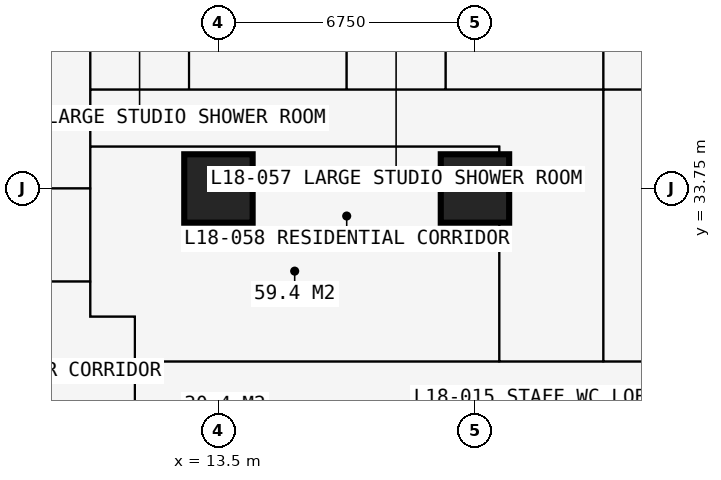
"""IFC4 building model, lengths in metres.
Left out: names, types, materials, properties, quantities, classifications, styles, units other than length and angle.
Written with IfcOpenShell. Run it as: python <this file> out.ifc"""

import sys

from ifc_helpers import new_model, si_unit, direction, frame, frame_2d, origin, origin_2d, place, context, subcontext, project, spatial, rectangle, extrude, element, fill, save


model = new_model("IFC4")
c1 = context("Model", 3, precision=1e-05, world=origin(), true_north=direction((0.0, 1.0)))
c2 = subcontext(c1, "Body", "Model", "MODEL_VIEW")
j1 = project(units=[si_unit("LENGTHUNIT", "METRE"), si_unit("PLANEANGLEUNIT", "RADIAN")], contexts=[c1])
p1 = place(None, origin())
s1 = spatial("IfcSite", under=j1, at=p1, CompositionType="ELEMENT")
p2 = place(p1, origin())
s2 = spatial("IfcBuilding", under=s1, at=p2, CompositionType="ELEMENT")
p3 = place(p2, frame((0.0, 0.0, 68.4)))
s3 = spatial("IfcBuildingStorey", under=s2, at=p3, CompositionType="ELEMENT", Elevation=68.4)
for number, where, z_axis, x_axis in (
    (1, (13.5, 33.75, 0.0), (0.0, 0.0, 1.0), (1.0, 0.0, 0.0)),
    (2, (20.25, 33.75, 0.0), (0.0, 0.0, 1.0), (1.0, 0.0, 0.0)),
):
    element("IfcColumn", number, at=place(p3, frame(where, z_axis=z_axis, x_axis=x_axis)), inside=s3, PredefinedType="COLUMN", context=c2, shape_type="SweptSolid", body=[
        extrude(rectangle(XDim=1.8, YDim=1.8, at=origin_2d()), origin(), (0.0, 0.0, 1.0), 3.6),
    ])
p4 = place(p3, frame((-0.734, 33.75, 0.0), z_axis=(0.0, 0.0, 1.0), x_axis=(1.0, 0.0, 0.0)))
e3 = element("IfcWall", 3, at=p4, inside=s3, PredefinedType="PARTITIONING", context=c2, shape_type="SweptSolid", body=[
    extrude(rectangle(XDim=10.859, YDim=0.15, at=frame_2d((5.429, 0.0))), origin(), (0.0, 0.0, 1.0), 2.877),
])
p5 = place(p4, frame((8.434, 0.0, 0.0)))
e4 = element("IfcOpeningElement", 4, at=p5, cuts=e3, PredefinedType="OPENING", context=c2, shape_type="SweptSolid", body=[
    extrude(rectangle(XDim=1.0, YDim=2.2, at=frame_2d((0.5, 1.1))), frame((0.0, 0.085, 0.0), z_axis=(0.0, -1.0, 0.0), x_axis=(1.0, 0.0, 0.0)), (0.0, 0.0, 1.0), 0.17),
])
p6 = place(p3, frame((5.65, 31.3, 0.0), z_axis=(0.0, 0.0, 1.0), x_axis=(1.0, 0.0, 0.0)))
e5 = element("IfcWall", 5, at=p6, inside=s3, PredefinedType="PARTITIONING", context=c2, shape_type="SweptSolid", body=[
    extrude(rectangle(XDim=4.475, YDim=0.15, at=frame_2d((2.238, 0.0))), origin(), (0.0, 0.0, 1.0), 3.375),
])
p7 = place(p3, frame((10.125, 30.375, 0.0), z_axis=(0.0, 0.0, 1.0), x_axis=(0.0, 1.0, 0.0)))
e6 = element("IfcWall", 6, at=p7, inside=s3, PredefinedType="PARTITIONING", context=c2, shape_type="SweptSolid", body=[
    extrude(rectangle(XDim=10.859, YDim=0.15, at=frame_2d((5.429, 0.0))), origin(), (0.0, 0.0, 1.0), 3.375),
])
p8 = place(p3, frame((10.125, 30.375, 0.0), z_axis=(0.0, 0.0, 1.0), x_axis=(1.0, 0.0, 0.0)))
e7 = element("IfcWall", 7, at=p8, inside=s3, PredefinedType="PARTITIONING", context=c2, shape_type="SweptSolid", body=[
    extrude(rectangle(XDim=1.175, YDim=0.15, at=frame_2d((0.587, 0.0))), origin(), (0.0, 0.0, 1.0), 3.375),
])
p9 = place(p3, frame((10.125, 34.85, 0.0), z_axis=(0.0, 0.0, 1.0), x_axis=(1.0, 0.0, 0.0)))
e8 = element("IfcWall", 8, at=p9, inside=s3, PredefinedType="PARTITIONING", context=c2, shape_type="SweptSolid", body=[
    extrude(rectangle(XDim=10.762, YDim=0.15, at=frame_2d((5.381, 0.0))), origin(), (0.0, 0.0, 1.0), 3.375),
])
p10 = place(p9, frame((4.9, 0.0, 0.0)))
e9 = element("IfcOpeningElement", 9, at=p10, cuts=e8, PredefinedType="OPENING", context=c2, shape_type="SweptSolid", body=[
    extrude(rectangle(XDim=0.95, YDim=2.2, at=frame_2d((0.475, 1.1))), frame((0.0, 0.085, 0.0), z_axis=(0.0, -1.0, 0.0), x_axis=(1.0, 0.0, 0.0)), (0.0, 0.0, 1.0), 0.17),
])
p11 = place(p3, frame((10.125, 36.35, 0.0), z_axis=(0.0, 0.0, 1.0), x_axis=(1.0, 0.0, 0.0)))
e10 = element("IfcWall", 10, at=p11, inside=s3, PredefinedType="PARTITIONING", context=c2, shape_type="SweptSolid", body=[
    extrude(rectangle(XDim=23.625, YDim=0.15, at=frame_2d((11.812, 0.0))), origin(), (0.0, 0.0, 1.0), 3.375),
])
p12 = place(p11, frame((21.45, 0.0, 0.0)))
e11 = element("IfcOpeningElement", 11, at=p12, cuts=e10, PredefinedType="OPENING", context=c2, shape_type="SweptSolid", body=[
    extrude(rectangle(XDim=1.0, YDim=2.2, at=frame_2d((0.5, 1.1))), frame((0.0, 0.085, 0.0), z_axis=(0.0, -1.0, 0.0), x_axis=(1.0, 0.0, 0.0)), (0.0, 0.0, 1.0), 0.17),
])
p13 = place(p11, frame((17.125, 0.0, 0.0)))
e12 = element("IfcOpeningElement", 12, at=p13, cuts=e10, PredefinedType="OPENING", context=c2, shape_type="SweptSolid", body=[
    extrude(rectangle(XDim=0.95, YDim=2.2, at=frame_2d((0.475, 1.1))), frame((0.0, 0.085, 0.0), z_axis=(0.0, -1.0, 0.0), x_axis=(1.0, 0.0, 0.0)), (0.0, 0.0, 1.0), 0.17),
])
p14 = place(p11, frame((13.7, 0.0, 0.0)))
e13 = element("IfcOpeningElement", 13, at=p14, cuts=e10, PredefinedType="OPENING", context=c2, shape_type="SweptSolid", body=[
    extrude(rectangle(XDim=0.95, YDim=2.2, at=frame_2d((0.475, 1.1))), frame((0.0, 0.085, 0.0), z_axis=(0.0, -1.0, 0.0), x_axis=(1.0, 0.0, 0.0)), (0.0, 0.0, 1.0), 0.17),
])
p15 = place(p11, frame((4.2, 0.0, 0.0)))
e14 = element("IfcOpeningElement", 14, at=p15, cuts=e10, PredefinedType="OPENING", context=c2, shape_type="SweptSolid", body=[
    extrude(rectangle(XDim=0.95, YDim=2.2, at=frame_2d((0.475, 1.1))), frame((0.0, 0.085, 0.0), z_axis=(0.0, -1.0, 0.0), x_axis=(1.0, 0.0, 0.0)), (0.0, 0.0, 1.0), 0.17),
])
p16 = place(p11, frame((10.95, 0.0, 0.0)))
e15 = element("IfcOpeningElement", 15, at=p16, cuts=e10, PredefinedType="OPENING", context=c2, shape_type="SweptSolid", body=[
    extrude(rectangle(XDim=0.95, YDim=2.2, at=frame_2d((0.475, 1.1))), frame((0.0, 0.085, 0.0), z_axis=(0.0, -1.0, 0.0), x_axis=(1.0, 0.0, 0.0)), (0.0, 0.0, 1.0), 0.17),
])
p17 = place(p3, frame((11.3, 11.3, 0.0), z_axis=(0.0, 0.0, 1.0), x_axis=(0.0, 1.0, 0.0)))
e16 = element("IfcWall", 16, at=p17, inside=s3, PredefinedType="PARTITIONING", context=c2, shape_type="SweptSolid", body=[
    extrude(rectangle(XDim=19.075, YDim=0.15, at=frame_2d((9.538, 0.0))), origin(), (0.0, 0.0, 1.0), 3.375),
])
p18 = place(p17, frame((12.875, 0.0, 0.0)))
e17 = element("IfcOpeningElement", 17, at=p18, cuts=e16, PredefinedType="OPENING", context=c2, shape_type="SweptSolid", body=[
    extrude(rectangle(XDim=1.0, YDim=2.2, at=frame_2d((0.5, 1.1))), frame((0.0, 0.085, 0.0), z_axis=(0.0, -1.0, 0.0), x_axis=(1.0, 0.0, 0.0)), (0.0, 0.0, 1.0), 0.17),
])
p19 = place(p17, frame((10.438, 0.0, 0.0)))
e18 = element("IfcOpeningElement", 18, at=p19, cuts=e16, PredefinedType="OPENING", context=c2, shape_type="SweptSolid", body=[
    extrude(rectangle(XDim=1.0, YDim=2.2, at=frame_2d((0.5, 1.1))), frame((0.0, 0.085, 0.0), z_axis=(0.0, -1.0, 0.0), x_axis=(1.0, 0.0, 0.0)), (0.0, 0.0, 1.0), 0.17),
])
p20 = place(p17, frame((15.675, 0.0, 0.0)))
e19 = element("IfcOpeningElement", 19, at=p20, cuts=e16, PredefinedType="OPENING", context=c2, shape_type="SweptSolid", body=[
    extrude(rectangle(XDim=0.95, YDim=2.2, at=frame_2d((0.475, 1.1))), frame((0.0, 0.085, 0.0), z_axis=(0.0, -1.0, 0.0), x_axis=(1.0, 0.0, 0.0)), (0.0, 0.0, 1.0), 0.17),
])
p21 = place(p3, frame((11.3, 29.2, 0.0), z_axis=(0.0, 0.0, 1.0), x_axis=(1.0, 0.0, 0.0)))
e20 = element("IfcWall", 20, at=p21, inside=s3, PredefinedType="PARTITIONING", context=c2, shape_type="SweptSolid", body=[
    extrude(rectangle(XDim=19.075, YDim=0.15, at=frame_2d((9.538, 0.0))), origin(), (0.0, 0.0, 1.0), 3.375),
])
p22 = place(p21, frame((12.875, 0.0, 0.0)))
e21 = element("IfcOpeningElement", 21, at=p22, cuts=e20, PredefinedType="OPENING", context=c2, shape_type="SweptSolid", body=[
    extrude(rectangle(XDim=1.0, YDim=2.2, at=frame_2d((0.5, 1.1))), frame((0.0, 0.085, 0.0), z_axis=(0.0, -1.0, 0.0), x_axis=(1.0, 0.0, 0.0)), (0.0, 0.0, 1.0), 0.17),
])
p23 = place(p21, frame((10.438, 0.0, 0.0)))
e22 = element("IfcOpeningElement", 22, at=p23, cuts=e20, PredefinedType="OPENING", context=c2, shape_type="SweptSolid", body=[
    extrude(rectangle(XDim=1.0, YDim=2.2, at=frame_2d((0.5, 1.1))), frame((0.0, 0.085, 0.0), z_axis=(0.0, -1.0, 0.0), x_axis=(1.0, 0.0, 0.0)), (0.0, 0.0, 1.0), 0.17),
])
p24 = place(p21, frame((14.875, 0.0, 0.0)))
e23 = element("IfcOpeningElement", 23, at=p24, cuts=e20, PredefinedType="OPENING", context=c2, shape_type="SweptSolid", body=[
    extrude(rectangle(XDim=0.95, YDim=2.2, at=frame_2d((0.475, 1.1))), frame((0.0, 0.085, 0.0), z_axis=(0.0, -1.0, 0.0), x_axis=(1.0, 0.0, 0.0)), (0.0, 0.0, 1.0), 0.17),
])
p25 = place(p3, frame((12.725, 36.35, 0.0), z_axis=(0.0, 0.0, 1.0), x_axis=(0.0, 1.0, 0.0)))
e24 = element("IfcWall", 24, at=p25, inside=s3, PredefinedType="PARTITIONING", context=c2, shape_type="SweptSolid", body=[
    extrude(rectangle(XDim=2.4, YDim=0.1, at=frame_2d((1.2, 0.0))), origin(), (0.0, 0.0, 1.0), 3.375),
])
p26 = place(p3, frame((16.875, 36.35, 0.0), z_axis=(0.0, 0.0, 1.0), x_axis=(0.0, 1.0, 0.0)))
e25 = element("IfcWall", 25, at=p26, inside=s3, PredefinedType="PARTITIONING", context=c2, shape_type="SweptSolid", body=[
    extrude(rectangle(XDim=4.884, YDim=0.175, at=frame_2d((2.442, 0.0))), origin(), (0.0, 0.0, 1.0), 3.375),
])
p27 = place(p26, frame((0.75, 0.0, 0.0)))
e26 = element("IfcOpeningElement", 26, at=p27, cuts=e25, PredefinedType="OPENING", context=c2, shape_type="SweptSolid", body=[
    extrude(rectangle(XDim=0.9, YDim=2.2, at=frame_2d((0.45, 1.1))), frame((0.0, 0.097, 0.0), z_axis=(0.0, -1.0, 0.0), x_axis=(1.0, 0.0, 0.0)), (0.0, 0.0, 1.0), 0.195),
])
p28 = place(p3, frame((19.475, 36.35, 0.0), z_axis=(0.0, 0.0, 1.0), x_axis=(0.0, 1.0, 0.0)))
e27 = element("IfcWall", 27, at=p28, inside=s3, PredefinedType="PARTITIONING", context=c2, shape_type="SweptSolid", body=[
    extrude(rectangle(XDim=2.4, YDim=0.1, at=frame_2d((1.2, 0.0))), origin(), (0.0, 0.0, 1.0), 3.375),
])
p29 = place(p3, frame((20.887, 29.2, 0.0), z_axis=(0.0, 0.0, 1.0), x_axis=(0.0, 1.0, 0.0)))
e28 = element("IfcWall", 28, at=p29, inside=s3, PredefinedType="PARTITIONING", context=c2, shape_type="SweptSolid", body=[
    extrude(rectangle(XDim=5.65, YDim=0.15, at=frame_2d((2.825, 0.0))), origin(), (0.0, 0.0, 1.0), 3.375),
])
p30 = place(p3, frame((23.625, 29.2, 0.0), z_axis=(0.0, 0.0, 1.0), x_axis=(0.0, 1.0, 0.0)))
e29 = element("IfcWall", 29, at=p30, inside=s3, PredefinedType="PARTITIONING", context=c2, shape_type="SweptSolid", body=[
    extrude(rectangle(XDim=12.034, YDim=0.15, at=frame_2d((6.017, 0.0))), origin(), (0.0, 0.0, 1.0), 3.375),
])
p31 = place(p14, origin())
e30 = element("IfcDoor", 30, at=p31, inside=s3, OperationType="SINGLE_SWING_LEFT", PredefinedType="DOOR", context=c2, shape_type="SweptSolid", body=[
    extrude(rectangle(XDim=0.95, YDim=2.2, at=frame_2d((0.475, 1.1))), frame((0.0, 0.025, 0.0), z_axis=(0.0, -1.0, 0.0), x_axis=(1.0, 0.0, 0.0)), (0.0, 0.0, 1.0), 0.05),
])
fill(e13, e30)
p32 = place(p22, origin())
e31 = element("IfcDoor", 31, at=p32, inside=s3, OperationType="SINGLE_SWING_LEFT", PredefinedType="DOOR", context=c2, shape_type="SweptSolid", body=[
    extrude(rectangle(XDim=1.0, YDim=2.2, at=frame_2d((0.5, 1.1))), frame((0.0, 0.025, 0.0), z_axis=(0.0, -1.0, 0.0), x_axis=(1.0, 0.0, 0.0)), (0.0, 0.0, 1.0), 0.05),
])
fill(e21, e31)
p33 = place(p15, origin())
e32 = element("IfcDoor", 32, at=p33, inside=s3, OperationType="SINGLE_SWING_LEFT", PredefinedType="DOOR", context=c2, shape_type="SweptSolid", body=[
    extrude(rectangle(XDim=0.95, YDim=2.2, at=frame_2d((0.475, 1.1))), frame((0.0, 0.025, 0.0), z_axis=(0.0, -1.0, 0.0), x_axis=(1.0, 0.0, 0.0)), (0.0, 0.0, 1.0), 0.05),
])
fill(e14, e32)
p34 = place(p16, origin())
e33 = element("IfcDoor", 33, at=p34, inside=s3, OperationType="SINGLE_SWING_LEFT", PredefinedType="DOOR", context=c2, shape_type="SweptSolid", body=[
    extrude(rectangle(XDim=0.95, YDim=2.2, at=frame_2d((0.475, 1.1))), frame((0.0, 0.025, 0.0), z_axis=(0.0, -1.0, 0.0), x_axis=(1.0, 0.0, 0.0)), (0.0, 0.0, 1.0), 0.05),
])
fill(e15, e33)
p35 = place(p27, origin())
e34 = element("IfcDoor", 34, at=p35, inside=s3, OperationType="SINGLE_SWING_RIGHT", PredefinedType="DOOR", context=c2, shape_type="SweptSolid", body=[
    extrude(rectangle(XDim=0.9, YDim=2.2, at=frame_2d((0.45, 1.1))), frame((0.0, 0.025, 0.0), z_axis=(0.0, -1.0, 0.0), x_axis=(1.0, 0.0, 0.0)), (0.0, 0.0, 1.0), 0.05),
])
fill(e26, e34)
p36 = place(p23, origin())
e35 = element("IfcDoor", 35, at=p36, inside=s3, OperationType="SINGLE_SWING_LEFT", PredefinedType="DOOR", context=c2, shape_type="SweptSolid", body=[
    extrude(rectangle(XDim=1.0, YDim=2.2, at=frame_2d((0.5, 1.1))), frame((0.0, 0.025, 0.0), z_axis=(0.0, -1.0, 0.0), x_axis=(1.0, 0.0, 0.0)), (0.0, 0.0, 1.0), 0.05),
])
fill(e22, e35)
p37 = place(p10, origin())
e36 = element("IfcDoor", 36, at=p37, inside=s3, OperationType="SINGLE_SWING_LEFT", PredefinedType="DOOR", context=c2, shape_type="SweptSolid", body=[
    extrude(rectangle(XDim=0.95, YDim=2.2, at=frame_2d((0.475, 1.1))), frame((0.0, 0.025, 0.0), z_axis=(0.0, -1.0, 0.0), x_axis=(1.0, 0.0, 0.0)), (0.0, 0.0, 1.0), 0.05),
])
fill(e9, e36)
save(model, sys.argv[1])
